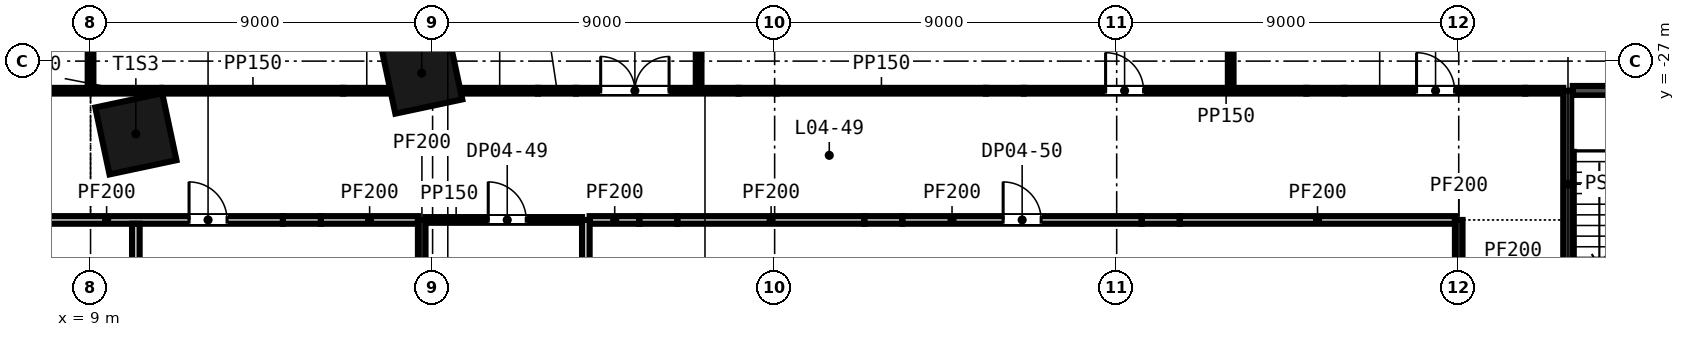
"""IFC4 building model, lengths in metres.
Left out: names, types, materials, properties, quantities, classifications, styles, units other than length and angle.
Written with IfcOpenShell. Run it as: python <this file> out.ifc"""

import sys

from ifc_helpers import new_model, si_unit, direction, frame, frame_2d, origin, origin_2d, place, context, subcontext, project, spatial, rectangle, extrude, element, fill, save


model = new_model("IFC4")
c1 = context("Model", 3, precision=1e-05, world=origin(), true_north=direction((0.0, 1.0)))
c2 = subcontext(c1, "Body", "Model", "MODEL_VIEW")
j1 = project(units=[si_unit("LENGTHUNIT", "METRE"), si_unit("PLANEANGLEUNIT", "RADIAN")], contexts=[c1])
p1 = place(None, origin())
s1 = spatial("IfcSite", under=j1, at=p1, CompositionType="ELEMENT")
p2 = place(p1, origin())
s2 = spatial("IfcBuilding", under=s1, at=p2, CompositionType="ELEMENT")
p3 = place(p2, frame((0.0, 0.0, 27.0)))
s3 = spatial("IfcBuildingStorey", under=s2, at=p3, CompositionType="ELEMENT", Elevation=27.0)
for number, where, z_axis, x_axis in (
    (1, (10.192, -28.914, -0.3), (0.0, 0.0, 1.0), (0.978, 0.208, 0.0)),
    (2, (17.714, -27.315, -0.3), (0.0, 0.0, 1.0), (0.978, 0.208, 0.0)),
):
    element("IfcColumn", number, at=place(p3, frame(where, z_axis=z_axis, x_axis=x_axis)), inside=s3, PredefinedType="COLUMN", context=c2, shape_type="SweptSolid", body=[
        extrude(rectangle(XDim=1.8, YDim=1.8, at=origin_2d()), origin(), (0.0, 0.0, 1.0), 4.5),
    ])
p4 = place(p3, frame((4.344, -31.179, 0.0), z_axis=(0.0, 0.0, 1.0), x_axis=(1.0, 0.0, 0.0)))
e3 = element("IfcWall", 3, at=p4, inside=s3, PredefinedType="PARTITIONING", context=c2, shape_type="SweptSolid", body=[
    extrude(rectangle(XDim=9.718, YDim=0.2, at=frame_2d((4.859, 0.0))), origin(), (0.0, 0.0, 1.0), 4.2),
])
p5 = place(p4, frame((1.9, 0.0, 0.0)))
e4 = element("IfcOpeningElement", 4, at=p5, cuts=e3, PredefinedType="OPENING", context=c2, shape_type="SweptSolid", body=[
    extrude(rectangle(XDim=1.0, YDim=2.1, at=frame_2d((0.5, 1.05))), frame((0.0, 0.11, 0.0), z_axis=(0.0, -1.0, 0.0), x_axis=(1.0, 0.0, 0.0)), (0.0, 0.0, 1.0), 0.22),
])
p6 = place(p4, frame((7.249, 0.0, 0.0)))
e5 = element("IfcOpeningElement", 5, at=p6, cuts=e3, PredefinedType="OPENING", context=c2, shape_type="SweptSolid", body=[
    extrude(rectangle(XDim=1.0, YDim=2.1, at=frame_2d((0.5, 1.05))), frame((0.0, 0.11, 0.0), z_axis=(0.0, -1.0, 0.0), x_axis=(1.0, 0.0, 0.0)), (0.0, 0.0, 1.0), 0.22),
])
p7 = place(p3, frame((14.062, -31.179, 0.0), z_axis=(0.0, 0.0, 1.0), x_axis=(1.0, 0.0, 0.0)))
e6 = element("IfcWall", 6, at=p7, inside=s3, PredefinedType="PARTITIONING", context=c2, shape_type="SweptSolid", body=[
    extrude(rectangle(XDim=1.0, YDim=0.2, at=frame_2d((0.5, 0.0))), origin(), (0.0, 0.0, 1.0), 3.451),
])
p8 = place(p3, frame((15.062, -31.179, 0.0), z_axis=(0.0, 0.0, 1.0), x_axis=(1.0, 0.0, 0.0)))
e7 = element("IfcWall", 7, at=p8, inside=s3, PredefinedType="PARTITIONING", context=c2, shape_type="SweptSolid", body=[
    extrude(rectangle(XDim=2.552, YDim=0.2, at=frame_2d((1.276, 0.0))), origin(), (0.0, 0.0, 1.0), 4.2),
])
p9 = place(p3, frame((17.814, -31.179, 0.0), z_axis=(0.0, 0.0, 1.0), x_axis=(1.0, 0.0, 0.0)))
e8 = element("IfcWall", 8, at=p9, inside=s3, PredefinedType="PARTITIONING", context=c2, shape_type="SweptSolid", body=[
    extrude(rectangle(XDim=4.118, YDim=0.15, at=frame_2d((2.059, 0.0))), origin(), (0.0, 0.0, 1.0), 4.2),
])
p10 = place(p9, frame((1.65, 0.0, 0.0)))
e9 = element("IfcOpeningElement", 9, at=p10, cuts=e8, PredefinedType="OPENING", context=c2, shape_type="SweptSolid", body=[
    extrude(rectangle(XDim=1.0, YDim=2.1, at=frame_2d((0.5, 1.05))), frame((0.0, 0.085, 0.0), z_axis=(0.0, -1.0, 0.0), x_axis=(1.0, 0.0, 0.0)), (0.0, 0.0, 1.0), 0.17),
])
p11 = place(p3, frame((22.132, -31.179, 0.0), z_axis=(0.0, 0.0, 1.0), x_axis=(1.0, 0.0, 0.0)))
e10 = element("IfcWall", 10, at=p11, inside=s3, PredefinedType="PARTITIONING", context=c2, shape_type="SweptSolid", body=[
    extrude(rectangle(XDim=1.31, YDim=0.2, at=frame_2d((0.655, 0.0))), origin(), (0.0, 0.0, 1.0), 4.2),
])
p12 = place(p3, frame((23.442, -31.179, 0.0), z_axis=(0.0, 0.0, 1.0), x_axis=(1.0, 0.0, 0.0)))
e11 = element("IfcWall", 11, at=p12, inside=s3, PredefinedType="PARTITIONING", context=c2, shape_type="SweptSolid", body=[
    extrude(rectangle(XDim=1.0, YDim=0.2, at=frame_2d((0.5, 0.0))), origin(), (0.0, 0.0, 1.0), 3.298),
])
p13 = place(p3, frame((24.442, -31.179, 0.0), z_axis=(0.0, 0.0, 1.0), x_axis=(1.0, 0.0, 0.0)))
e12 = element("IfcWall", 12, at=p13, inside=s3, PredefinedType="PARTITIONING", context=c2, shape_type="SweptSolid", body=[
    extrude(rectangle(XDim=4.921, YDim=0.2, at=frame_2d((2.46, 0.0))), origin(), (0.0, 0.0, 1.0), 4.2),
])
p14 = place(p3, frame((29.363, -31.179, 0.0), z_axis=(0.0, 0.0, 1.0), x_axis=(1.0, 0.0, 0.0)))
e13 = element("IfcWall", 13, at=p14, inside=s3, PredefinedType="PARTITIONING", context=c2, shape_type="SweptSolid", body=[
    extrude(rectangle(XDim=1.0, YDim=0.2, at=frame_2d((0.5, 0.0))), origin(), (0.0, 0.0, 1.0), 3.219),
])
p15 = place(p3, frame((30.363, -31.179, 0.0), z_axis=(0.0, 0.0, 1.0), x_axis=(1.0, 0.0, 0.0)))
e14 = element("IfcWall", 14, at=p15, inside=s3, PredefinedType="PARTITIONING", context=c2, shape_type="SweptSolid", body=[
    extrude(rectangle(XDim=6.297, YDim=0.2, at=frame_2d((3.148, 0.0))), origin(), (0.0, 0.0, 1.0), 4.2),
])
p16 = place(p15, frame((2.65, 0.0, 0.0)))
e15 = element("IfcOpeningElement", 15, at=p16, cuts=e14, PredefinedType="OPENING", context=c2, shape_type="SweptSolid", body=[
    extrude(rectangle(XDim=1.0, YDim=2.1, at=frame_2d((0.5, 1.05))), frame((0.0, 0.11, 0.0), z_axis=(0.0, -1.0, 0.0), x_axis=(1.0, 0.0, 0.0)), (0.0, 0.0, 1.0), 0.22),
])
p17 = place(p3, frame((36.659, -31.179, 0.0), z_axis=(0.0, 0.0, 1.0), x_axis=(1.0, 0.0, 0.0)))
e16 = element("IfcWall", 16, at=p17, inside=s3, PredefinedType="PARTITIONING", context=c2, shape_type="SweptSolid", body=[
    extrude(rectangle(XDim=1.0, YDim=0.2, at=frame_2d((0.5, 0.0))), origin(), (0.0, 0.0, 1.0), 3.111),
])
p18 = place(p3, frame((37.659, -31.179, 0.0), z_axis=(0.0, 0.0, 1.0), x_axis=(1.0, 0.0, 0.0)))
e17 = element("IfcWall", 17, at=p18, inside=s3, PredefinedType="PARTITIONING", context=c2, shape_type="SweptSolid", body=[
    extrude(rectangle(XDim=7.241, YDim=0.2, at=frame_2d((3.62, 0.0))), origin(), (0.0, 0.0, 1.0), 4.2),
])
p19 = place(p3, frame((0.75, -27.779, 0.0), z_axis=(0.0, 0.0, 1.0), x_axis=(1.0, 0.0, 0.0)))
e18 = element("IfcWall", 18, at=p19, inside=s3, PredefinedType="PARTITIONING", context=c2, shape_type="SweptSolid", body=[
    extrude(rectangle(XDim=8.175, YDim=0.15, at=frame_2d((4.087, 0.0))), origin(), (0.0, 0.0, 1.0), 4.2),
])
p20 = place(p3, frame((9.075, -27.779, 0.0), z_axis=(0.0, 0.0, 1.0), x_axis=(1.0, 0.0, 0.0)))
e19 = element("IfcWall", 19, at=p20, inside=s3, PredefinedType="PARTITIONING", context=c2, shape_type="SweptSolid", body=[
    extrude(rectangle(XDim=1.773, YDim=0.15, at=frame_2d((0.886, 0.0))), origin(), (0.0, 0.0, 1.0), 4.2),
])
p21 = place(p3, frame((10.887, -27.779, 0.0), z_axis=(0.0, 0.0, 1.0), x_axis=(1.0, 0.0, 0.0)))
e20 = element("IfcWall", 20, at=p21, inside=s3, PredefinedType="PARTITIONING", context=c2, shape_type="SweptSolid", body=[
    extrude(rectangle(XDim=4.762, YDim=0.15, at=frame_2d((2.381, 0.0))), origin(), (0.0, 0.0, 1.0), 4.2),
])
p22 = place(p3, frame((15.65, -27.779, 0.0), z_axis=(0.0, 0.0, 1.0), x_axis=(1.0, 0.0, 0.0)))
e21 = element("IfcWall", 21, at=p22, inside=s3, PredefinedType="PARTITIONING", context=c2, shape_type="SweptSolid", body=[
    extrude(rectangle(XDim=1.227, YDim=0.15, at=frame_2d((0.613, 0.0))), origin(), (0.0, 0.0, 1.0), 3.2),
])
p23 = place(p3, frame((18.748, -27.779, 0.0), z_axis=(0.0, 0.0, 1.0), x_axis=(1.0, 0.0, 0.0)))
e22 = element("IfcWall", 22, at=p23, inside=s3, PredefinedType="PARTITIONING", context=c2, shape_type="SweptSolid", body=[
    extrude(rectangle(XDim=2.024, YDim=0.15, at=frame_2d((1.012, 0.0))), origin(), (0.0, 0.0, 1.0), 4.2),
])
p24 = place(p3, frame((20.773, -27.779, 0.0), z_axis=(0.0, 0.0, 1.0), x_axis=(1.0, 0.0, 0.0)))
e23 = element("IfcWall", 23, at=p24, inside=s3, PredefinedType="PARTITIONING", context=c2, shape_type="SweptSolid", body=[
    extrude(rectangle(XDim=1.0, YDim=0.15, at=frame_2d((0.5, 0.0))), origin(), (0.0, 0.0, 1.0), 3.298),
])
p25 = place(p3, frame((21.773, -27.779, 0.0), z_axis=(0.0, 0.0, 1.0), x_axis=(1.0, 0.0, 0.0)))
e24 = element("IfcWall", 24, at=p25, inside=s3, PredefinedType="PARTITIONING", context=c2, shape_type="SweptSolid", body=[
    extrude(rectangle(XDim=4.279, YDim=0.15, at=frame_2d((2.14, 0.0))), origin(), (0.0, 0.0, 1.0), 4.2),
])
p26 = place(p25, frame((0.65, 0.0, 0.0)))
e25 = element("IfcOpeningElement", 25, at=p26, cuts=e24, PredefinedType="OPENING", context=c2, shape_type="SweptSolid", body=[
    extrude(rectangle(XDim=1.8, YDim=2.4, at=frame_2d((0.9, 1.2))), frame((0.0, 0.085, 0.0), z_axis=(0.0, -1.0, 0.0), x_axis=(1.0, 0.0, 0.0)), (0.0, 0.0, 1.0), 0.17),
])
p27 = place(p3, frame((26.052, -27.779, 0.0), z_axis=(0.0, 0.0, 1.0), x_axis=(1.0, 0.0, 0.0)))
e26 = element("IfcWall", 26, at=p27, inside=s3, PredefinedType="PARTITIONING", context=c2, shape_type="SweptSolid", body=[
    extrude(rectangle(XDim=1.0, YDim=0.15, at=frame_2d((0.5, 0.0))), origin(), (0.0, 0.0, 1.0), 3.219),
])
p28 = place(p3, frame((27.052, -27.779, 0.0), z_axis=(0.0, 0.0, 1.0), x_axis=(1.0, 0.0, 0.0)))
e27 = element("IfcWall", 27, at=p28, inside=s3, PredefinedType="PARTITIONING", context=c2, shape_type="SweptSolid", body=[
    extrude(rectangle(XDim=5.506, YDim=0.15, at=frame_2d((2.753, 0.0))), origin(), (0.0, 0.0, 1.0), 4.2),
])
p29 = place(p3, frame((32.558, -27.779, 0.0), z_axis=(0.0, 0.0, 1.0), x_axis=(1.0, 0.0, 0.0)))
e28 = element("IfcWall", 28, at=p29, inside=s3, PredefinedType="PARTITIONING", context=c2, shape_type="SweptSolid", body=[
    extrude(rectangle(XDim=1.0, YDim=0.15, at=frame_2d((0.5, 0.0))), origin(), (0.0, 0.0, 1.0), 3.111),
])
p30 = place(p3, frame((33.558, -27.779, 0.0), z_axis=(0.0, 0.0, 1.0), x_axis=(1.0, 0.0, 0.0)))
e29 = element("IfcWall", 29, at=p30, inside=s3, PredefinedType="PARTITIONING", context=c2, shape_type="SweptSolid", body=[
    extrude(rectangle(XDim=7.432, YDim=0.15, at=frame_2d((3.716, 0.0))), origin(), (0.0, 0.0, 1.0), 4.2),
])
p31 = place(p30, frame((2.15, 0.0, 0.0)))
e30 = element("IfcOpeningElement", 30, at=p31, cuts=e29, PredefinedType="OPENING", context=c2, shape_type="SweptSolid", body=[
    extrude(rectangle(XDim=1.0, YDim=2.1, at=frame_2d((0.5, 1.05))), frame((0.0, 0.085, 0.0), z_axis=(0.0, -1.0, 0.0), x_axis=(1.0, 0.0, 0.0)), (0.0, 0.0, 1.0), 0.17),
])
p32 = place(p3, frame((40.99, -27.779, 0.0), z_axis=(0.0, 0.0, 1.0), x_axis=(1.0, 0.0, 0.0)))
e31 = element("IfcWall", 31, at=p32, inside=s3, PredefinedType="PARTITIONING", context=c2, shape_type="SweptSolid", body=[
    extrude(rectangle(XDim=1.0, YDim=0.15, at=frame_2d((0.5, 0.0))), origin(), (0.0, 0.0, 1.0), 3.111),
])
p33 = place(p3, frame((41.99, -27.779, 0.0), z_axis=(0.0, 0.0, 1.0), x_axis=(1.0, 0.0, 0.0)))
e32 = element("IfcWall", 32, at=p33, inside=s3, PredefinedType="PARTITIONING", context=c2, shape_type="SweptSolid", body=[
    extrude(rectangle(XDim=4.76, YDim=0.15, at=frame_2d((2.38, 0.0))), origin(), (0.0, 0.0, 1.0), 4.2),
])
p34 = place(p33, frame((1.9, 0.0, 0.0)))
e33 = element("IfcOpeningElement", 33, at=p34, cuts=e32, PredefinedType="OPENING", context=c2, shape_type="SweptSolid", body=[
    extrude(rectangle(XDim=1.0, YDim=2.1, at=frame_2d((0.5, 1.05))), frame((0.0, 0.085, 0.0), z_axis=(0.0, -1.0, 0.0), x_axis=(1.0, 0.0, 0.0)), (0.0, 0.0, 1.0), 0.17),
])
p35 = place(p3, frame((46.75, -27.779, 0.0), z_axis=(0.0, 0.0, 1.0), x_axis=(1.0, 0.0, 0.0)))
e34 = element("IfcWall", 34, at=p35, inside=s3, PredefinedType="PARTITIONING", context=c2, shape_type="SweptSolid", body=[
    extrude(rectangle(XDim=1.0, YDim=0.15, at=frame_2d((0.5, 0.0))), origin(), (0.0, 0.0, 1.0), 3.667),
])
p36 = place(p3, frame((48.0, -27.779, 0.0), z_axis=(0.0, 0.0, 1.0), x_axis=(1.0, 0.0, 0.0)))
e35 = element("IfcWall", 35, at=p36, inside=s3, PredefinedType="SHEAR", context=c2, shape_type="SweptSolid", body=[
    extrude(rectangle(XDim=3.0, YDim=0.25, at=frame_2d((1.5, 0.0))), origin(), (0.0, 0.0, 1.0), 4.2),
])
p37 = place(p3, frame((9.0, -27.778, 0.0), z_axis=(0.0, 0.0, 1.0), x_axis=(0.0, 1.0, 0.0)))
e36 = element("IfcWall", 36, at=p37, inside=s3, PredefinedType="PARTITIONING", context=c2, shape_type="SweptSolid", body=[
    extrude(rectangle(XDim=3.825, YDim=0.15, at=frame_2d((1.913, 0.0))), origin(), (0.0, 0.0, 1.0), 4.2),
])
p38 = place(p3, frame((10.192, -40.4, 0.0), z_axis=(0.0, 0.0, 1.0), x_axis=(0.0, 1.0, 0.0)))
e37 = element("IfcWall", 37, at=p38, inside=s3, PredefinedType="PARTITIONING", context=c2, shape_type="SweptSolid", body=[
    extrude(rectangle(XDim=9.121, YDim=0.2, at=frame_2d((4.561, 0.0))), origin(), (0.0, 0.0, 1.0), 4.2),
])
p39 = place(p3, frame((17.714, -37.132, 0.0), z_axis=(0.0, 0.0, 1.0), x_axis=(0.0, 1.0, 0.0)))
e38 = element("IfcWall", 38, at=p39, inside=s3, PredefinedType="PARTITIONING", context=c2, shape_type="SweptSolid", body=[
    extrude(rectangle(XDim=5.953, YDim=0.2, at=frame_2d((2.976, 0.0))), origin(), (0.0, 0.0, 1.0), 4.2),
])
p40 = place(p3, frame((22.032, -35.624, 0.0), z_axis=(0.0, 0.0, 1.0), x_axis=(0.0, 1.0, 0.0)))
e39 = element("IfcWall", 39, at=p40, inside=s3, PredefinedType="PARTITIONING", context=c2, shape_type="SweptSolid", body=[
    extrude(rectangle(XDim=4.445, YDim=0.2, at=frame_2d((2.222, 0.0))), origin(), (0.0, 0.0, 1.0), 4.2),
])
p41 = place(p3, frame((25.0, -27.704, 0.0), z_axis=(0.0, 0.0, 1.0), x_axis=(0.0, 1.0, 0.0)))
e40 = element("IfcWall", 40, at=p41, inside=s3, PredefinedType="PARTITIONING", context=c2, shape_type="SweptSolid", body=[
    extrude(rectangle(XDim=1.019, YDim=0.15, at=frame_2d((0.509, 0.0))), origin(), (0.0, 0.0, 1.0), 4.2),
])
p42 = place(p3, frame((39.0, -27.704, 0.0), z_axis=(0.0, 0.0, 1.0), x_axis=(0.0, 1.0, 0.0)))
e41 = element("IfcWall", 41, at=p42, inside=s3, PredefinedType="PARTITIONING", context=c2, shape_type="SweptSolid", body=[
    extrude(rectangle(XDim=1.077, YDim=0.15, at=frame_2d((0.539, 0.0))), origin(), (0.0, 0.0, 1.0), 4.2),
])
p43 = place(p3, frame((45.0, -34.6, 0.0), z_axis=(0.0, 0.0, 1.0), x_axis=(0.0, 1.0, 0.0)))
e42 = element("IfcWall", 42, at=p43, inside=s3, PredefinedType="PARTITIONING", context=c2, shape_type="SweptSolid", body=[
    extrude(rectangle(XDim=3.421, YDim=0.2, at=frame_2d((1.71, 0.0))), origin(), (0.0, 0.0, 1.0), 4.2),
])
p44 = place(p3, frame((47.875, -34.6, 0.0), z_axis=(0.0, 0.0, 1.0), x_axis=(0.0, 1.0, 0.0)))
e43 = element("IfcWall", 43, at=p44, inside=s3, PredefinedType="SHEAR", context=c2, shape_type="SweptSolid", body=[
    extrude(rectangle(XDim=6.821, YDim=0.25, at=frame_2d((3.411, 0.0))), origin(), (0.0, 0.0, 1.0), 4.2),
])
p45 = place(p44, frame((0.65, 0.0, 0.0)))
e44 = element("IfcOpeningElement", 44, at=p45, cuts=e43, PredefinedType="OPENING", context=c2, shape_type="SweptSolid", body=[
    extrude(rectangle(XDim=1.2, YDim=2.1, at=frame_2d((0.6, 1.05))), frame((0.0, 0.135, 0.0), z_axis=(0.0, -1.0, 0.0), x_axis=(1.0, 0.0, 0.0)), (0.0, 0.0, 1.0), 0.27),
])
p46 = place(p26, origin())
e45 = element("IfcDoor", 45, at=p46, inside=s3, OperationType="SINGLE_SWING_LEFT", PredefinedType="DOOR", context=c2, shape_type="SweptSolid", body=[
    extrude(rectangle(XDim=1.8, YDim=2.4, at=frame_2d((0.9, 1.2))), frame((0.0, 0.025, 0.0), z_axis=(0.0, -1.0, 0.0), x_axis=(1.0, 0.0, 0.0)), (0.0, 0.0, 1.0), 0.05),
])
fill(e25, e45)
p47 = place(p31, origin())
e46 = element("IfcDoor", 46, at=p47, inside=s3, OperationType="SINGLE_SWING_LEFT", PredefinedType="DOOR", context=c2, shape_type="SweptSolid", body=[
    extrude(rectangle(XDim=1.0, YDim=2.1, at=frame_2d((0.5, 1.05))), frame((0.0, 0.025, 0.0), z_axis=(0.0, -1.0, 0.0), x_axis=(1.0, 0.0, 0.0)), (0.0, 0.0, 1.0), 0.05),
])
fill(e30, e46)
p48 = place(p34, origin())
e47 = element("IfcDoor", 47, at=p48, inside=s3, OperationType="SINGLE_SWING_LEFT", PredefinedType="DOOR", context=c2, shape_type="SweptSolid", body=[
    extrude(rectangle(XDim=1.0, YDim=2.1, at=frame_2d((0.5, 1.05))), frame((0.0, 0.025, 0.0), z_axis=(0.0, -1.0, 0.0), x_axis=(1.0, 0.0, 0.0)), (0.0, 0.0, 1.0), 0.05),
])
fill(e33, e47)
p49 = place(p6, origin())
e48 = element("IfcDoor", 48, at=p49, inside=s3, OperationType="SINGLE_SWING_LEFT", PredefinedType="DOOR", context=c2, shape_type="SweptSolid", body=[
    extrude(rectangle(XDim=1.0, YDim=2.1, at=frame_2d((0.5, 1.05))), frame((0.0, 0.025, 0.0), z_axis=(0.0, -1.0, 0.0), x_axis=(1.0, 0.0, 0.0)), (0.0, 0.0, 1.0), 0.05),
])
fill(e5, e48)
p50 = place(p10, origin())
e49 = element("IfcDoor", 49, at=p50, inside=s3, OperationType="SINGLE_SWING_LEFT", PredefinedType="DOOR", context=c2, shape_type="SweptSolid", body=[
    extrude(rectangle(XDim=1.0, YDim=2.1, at=frame_2d((0.5, 1.05))), frame((0.0, 0.025, 0.0), z_axis=(0.0, -1.0, 0.0), x_axis=(1.0, 0.0, 0.0)), (0.0, 0.0, 1.0), 0.05),
])
fill(e9, e49)
p51 = place(p16, origin())
e50 = element("IfcDoor", 50, at=p51, inside=s3, OperationType="SINGLE_SWING_LEFT", PredefinedType="DOOR", context=c2, shape_type="SweptSolid", body=[
    extrude(rectangle(XDim=1.0, YDim=2.1, at=frame_2d((0.5, 1.05))), frame((0.0, 0.025, 0.0), z_axis=(0.0, -1.0, 0.0), x_axis=(1.0, 0.0, 0.0)), (0.0, 0.0, 1.0), 0.05),
])
fill(e15, e50)
save(model, sys.argv[1])
